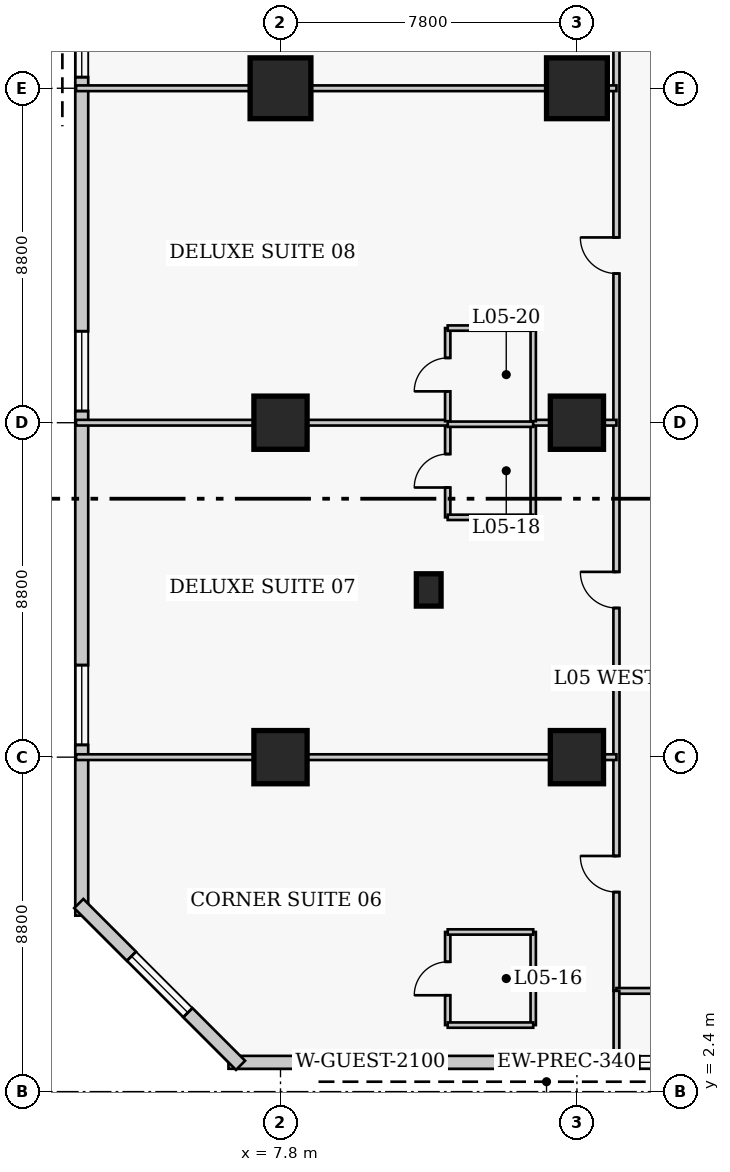
"""IFC4 building model, lengths in metres.
Left out: names, types, materials, properties, quantities, classifications, styles, units other than length and angle.
Written with IfcOpenShell. Run it as: python <this file> out.ifc"""

import sys

from ifc_helpers import new_model, si_unit, direction, frame, frame_2d, origin, origin_2d, place, context, subcontext, project, spatial, rectangle, extrude, element, fill, save


model = new_model("IFC4")
c1 = context("Model", 3, precision=1e-05, world=origin(), true_north=direction((0.0, 1.0)))
c2 = subcontext(c1, "Body", "Model", "MODEL_VIEW")
j1 = project(units=[si_unit("LENGTHUNIT", "METRE"), si_unit("PLANEANGLEUNIT", "RADIAN")], contexts=[c1])
p1 = place(None, origin())
s1 = spatial("IfcSite", under=j1, at=p1, CompositionType="ELEMENT")
p2 = place(p1, origin())
s2 = spatial("IfcBuilding", under=s1, at=p2, CompositionType="ELEMENT")
p3 = place(p2, frame((0.0, 0.0, 26.0)))
s3 = spatial("IfcBuildingStorey", under=s2, at=p3, CompositionType="ELEMENT", Elevation=26.0)
for number, where, z_axis, x_axis in (
    (1, (7.8, 11.2, 0.0), (0.0, 0.0, 1.0), (1.0, 0.0, 0.0)),
    (2, (7.8, 20.0, 0.0), (0.0, 0.0, 1.0), (1.0, 0.0, 0.0)),
):
    element("IfcColumn", number, at=place(p3, frame(where, z_axis=z_axis, x_axis=x_axis)), inside=s3, PredefinedType="COLUMN", context=c2, shape_type="SweptSolid", body=[
        extrude(rectangle(XDim=1.4, YDim=1.4, at=origin_2d()), origin(), (0.0, 0.0, 1.0), 3.8),
    ])
p4 = place(p3, frame((7.8, 28.8, 0.0), z_axis=(0.0, 0.0, 1.0), x_axis=(1.0, 0.0, 0.0)))
e3 = element("IfcColumn", 3, at=p4, inside=s3, PredefinedType="COLUMN", context=c2, shape_type="SweptSolid", body=[
    extrude(rectangle(XDim=1.6, YDim=1.6, at=origin_2d()), origin(), (0.0, 0.0, 1.0), 3.8),
])
p5 = place(p3, frame((15.6, 11.2, 0.0), z_axis=(0.0, 0.0, 1.0), x_axis=(1.0, 0.0, 0.0)))
e4 = element("IfcColumn", 4, at=p5, inside=s3, PredefinedType="COLUMN", context=c2, shape_type="SweptSolid", body=[
    extrude(rectangle(XDim=1.4, YDim=1.4, at=origin_2d()), origin(), (0.0, 0.0, 1.0), 3.8),
])
p6 = place(p3, frame((15.6, 20.0, -0.26), z_axis=(0.0, 0.0, 1.0), x_axis=(1.0, 0.0, 0.0)))
e5 = element("IfcColumn", 5, at=p6, inside=s3, PredefinedType="COLUMN", context=c2, shape_type="SweptSolid", body=[
    extrude(rectangle(XDim=1.4, YDim=1.4, at=origin_2d()), origin(), (0.0, 0.0, 1.0), 4.06),
])
p7 = place(p3, frame((15.6, 28.8, 0.0), z_axis=(0.0, 0.0, 1.0), x_axis=(1.0, 0.0, 0.0)))
e6 = element("IfcColumn", 6, at=p7, inside=s3, PredefinedType="COLUMN", context=c2, shape_type="SweptSolid", body=[
    extrude(rectangle(XDim=1.6, YDim=1.6, at=origin_2d()), origin(), (0.0, 0.0, 1.0), 3.8),
])
p8 = place(p3, frame((11.7, 15.6, 0.0), z_axis=(0.0, 0.0, 1.0), x_axis=(1.0, 0.0, 0.0)))
e7 = element("IfcColumn", 7, at=p8, inside=s3, PredefinedType="PILASTER", context=c2, shape_type="SweptSolid", body=[
    extrude(rectangle(XDim=0.65, YDim=0.85, at=origin_2d()), origin(), (0.0, 0.0, 1.0), 3.8),
])
p9 = place(p3, frame((6.43, 3.17, 0.0), z_axis=(0.0, 0.0, 1.0), x_axis=(1.0, 0.0, 0.0)))
e8 = element("IfcWall", 8, at=p9, inside=s3, PredefinedType="SOLIDWALL", context=c2, shape_type="SweptSolid", body=[
    extrude(rectangle(XDim=29.89, YDim=0.34, at=frame_2d((14.945, 0.0))), origin(), (0.0, 0.0, 1.0), 3.54),
])
p10 = place(p9, frame((2.686, 0.0, 0.85)))
e9 = element("IfcOpeningElement", 9, at=p10, cuts=e8, PredefinedType="OPENING", context=c2, shape_type="SweptSolid", body=[
    extrude(rectangle(XDim=2.1, YDim=1.85, at=frame_2d((1.05, 0.925))), frame((0.0, 0.18, 0.0), z_axis=(0.0, -1.0, 0.0), x_axis=(1.0, 0.0, 0.0)), (0.0, 0.0, 1.0), 0.36),
])
p11 = place(p9, frame((10.809, 0.0, 0.85)))
e10 = element("IfcOpeningElement", 10, at=p11, cuts=e8, PredefinedType="OPENING", context=c2, shape_type="SweptSolid", body=[
    extrude(rectangle(XDim=2.1, YDim=1.85, at=frame_2d((1.05, 0.925))), frame((0.0, 0.18, 0.0), z_axis=(0.0, -1.0, 0.0), x_axis=(1.0, 0.0, 0.0)), (0.0, 0.0, 1.0), 0.36),
])
p12 = place(p9, frame((18.281, 0.0, 0.85)))
e11 = element("IfcOpeningElement", 11, at=p12, cuts=e8, PredefinedType="OPENING", context=c2, shape_type="SweptSolid", body=[
    extrude(rectangle(XDim=2.1, YDim=1.85, at=frame_2d((1.05, 0.925))), frame((0.0, 0.18, 0.0), z_axis=(0.0, -1.0, 0.0), x_axis=(1.0, 0.0, 0.0)), (0.0, 0.0, 1.0), 0.36),
])
p13 = place(p9, frame((25.104, 0.0, 0.85)))
e12 = element("IfcOpeningElement", 12, at=p13, cuts=e8, PredefinedType="OPENING", context=c2, shape_type="SweptSolid", body=[
    extrude(rectangle(XDim=2.1, YDim=1.85, at=frame_2d((1.05, 0.925))), frame((0.0, 0.18, 0.0), z_axis=(0.0, -1.0, 0.0), x_axis=(1.0, 0.0, 0.0)), (0.0, 0.0, 1.0), 0.36),
])
p14 = place(p3, frame((2.57, 42.17, 0.0), z_axis=(0.0, 0.0, 1.0), x_axis=(0.0, -1.0, 0.0)))
e13 = element("IfcWall", 13, at=p14, inside=s3, PredefinedType="SOLIDWALL", context=c2, shape_type="SweptSolid", body=[
    extrude(rectangle(XDim=35.14, YDim=0.34, at=frame_2d((17.57, 0.0))), origin(), (0.0, 0.0, 1.0), 3.54),
])
p15 = place(p14, frame((3.343, 0.0, 0.85)))
e14 = element("IfcOpeningElement", 14, at=p15, cuts=e13, PredefinedType="OPENING", context=c2, shape_type="SweptSolid", body=[
    extrude(rectangle(XDim=2.1, YDim=1.85, at=frame_2d((1.05, 0.925))), frame((0.0, 0.18, 0.0), z_axis=(0.0, -1.0, 0.0), x_axis=(1.0, 0.0, 0.0)), (0.0, 0.0, 1.0), 0.36),
])
p16 = place(p14, frame((10.978, 0.0, 0.85)))
e15 = element("IfcOpeningElement", 15, at=p16, cuts=e13, PredefinedType="OPENING", context=c2, shape_type="SweptSolid", body=[
    extrude(rectangle(XDim=2.1, YDim=1.85, at=frame_2d((1.05, 0.925))), frame((0.0, 0.18, 0.0), z_axis=(0.0, -1.0, 0.0), x_axis=(1.0, 0.0, 0.0)), (0.0, 0.0, 1.0), 0.36),
])
p17 = place(p14, frame((19.762, 0.0, 0.85)))
e16 = element("IfcOpeningElement", 16, at=p17, cuts=e13, PredefinedType="OPENING", context=c2, shape_type="SweptSolid", body=[
    extrude(rectangle(XDim=2.1, YDim=1.85, at=frame_2d((1.05, 0.925))), frame((0.0, 0.18, 0.0), z_axis=(0.0, -1.0, 0.0), x_axis=(1.0, 0.0, 0.0)), (0.0, 0.0, 1.0), 0.36),
])
p18 = place(p14, frame((28.548, 0.0, 0.85)))
e17 = element("IfcOpeningElement", 17, at=p18, cuts=e13, PredefinedType="OPENING", context=c2, shape_type="SweptSolid", body=[
    extrude(rectangle(XDim=2.1, YDim=1.85, at=frame_2d((1.05, 0.925))), frame((0.0, 0.18, 0.0), z_axis=(0.0, -1.0, 0.0), x_axis=(1.0, 0.0, 0.0)), (0.0, 0.0, 1.0), 0.36),
])
p19 = place(p3, frame((2.492, 7.348, 0.0), z_axis=(0.0, 0.0, 1.0), x_axis=(0.707106781187, -0.707106781187, 0.0)))
e18 = element("IfcWall", 18, at=p19, inside=s3, PredefinedType="SOLIDWALL", context=c2, shape_type="SweptSolid", body=[
    extrude(rectangle(XDim=6.02, YDim=0.34, at=frame_2d((3.01, 0.0))), origin(), (0.0, 0.0, 1.0), 3.54),
])
p20 = place(p19, frame((1.96, 0.0, 0.85)))
e19 = element("IfcOpeningElement", 19, at=p20, cuts=e18, PredefinedType="OPENING", context=c2, shape_type="SweptSolid", body=[
    extrude(rectangle(XDim=2.1, YDim=1.85, at=frame_2d((1.05, 0.925))), frame((0.0, 0.18, 0.0), z_axis=(0.0, -1.0, 0.0), x_axis=(1.0, 0.0, 0.0)), (0.0, 0.0, 1.0), 0.36),
])
p21 = place(p3, frame((16.64, 5.05, 0.0), z_axis=(0.0, 0.0, 1.0), x_axis=(0.0, 1.0, 0.0)))
e20 = element("IfcWall", 20, at=p21, inside=s3, PredefinedType="PARTITIONING", context=c2, shape_type="SweptSolid", body=[
    extrude(rectangle(XDim=35.6, YDim=0.16, at=frame_2d((17.8, 0.0))), origin(), (0.0, 0.0, 1.0), 3.54),
])
p22 = place(p21, frame((2.6, 0.0, 0.0)))
e21 = element("IfcOpeningElement", 21, at=p22, cuts=e20, PredefinedType="OPENING", context=c2, shape_type="SweptSolid", body=[
    extrude(rectangle(XDim=0.95, YDim=2.1, at=frame_2d((0.475, 1.05))), frame((0.0, 0.09, 0.0), z_axis=(0.0, -1.0, 0.0), x_axis=(1.0, 0.0, 0.0)), (0.0, 0.0, 1.0), 0.18),
])
p23 = place(p21, frame((10.075, 0.0, 0.0)))
e22 = element("IfcOpeningElement", 22, at=p23, cuts=e20, PredefinedType="OPENING", context=c2, shape_type="SweptSolid", body=[
    extrude(rectangle(XDim=0.95, YDim=2.1, at=frame_2d((0.475, 1.05))), frame((0.0, 0.09, 0.0), z_axis=(0.0, -1.0, 0.0), x_axis=(1.0, 0.0, 0.0)), (0.0, 0.0, 1.0), 0.18),
])
p24 = place(p21, frame((18.875, 0.0, 0.0)))
e23 = element("IfcOpeningElement", 23, at=p24, cuts=e20, PredefinedType="OPENING", context=c2, shape_type="SweptSolid", body=[
    extrude(rectangle(XDim=0.95, YDim=2.1, at=frame_2d((0.475, 1.05))), frame((0.0, 0.09, 0.0), z_axis=(0.0, -1.0, 0.0), x_axis=(1.0, 0.0, 0.0)), (0.0, 0.0, 1.0), 0.18),
])
p25 = place(p21, frame((26.575, 0.0, 0.0)))
e24 = element("IfcOpeningElement", 24, at=p25, cuts=e20, PredefinedType="OPENING", context=c2, shape_type="SweptSolid", body=[
    extrude(rectangle(XDim=0.95, YDim=2.1, at=frame_2d((0.475, 1.05))), frame((0.0, 0.09, 0.0), z_axis=(0.0, -1.0, 0.0), x_axis=(1.0, 0.0, 0.0)), (0.0, 0.0, 1.0), 0.18),
])
p26 = place(p21, frame((30.9, 0.0, 0.0)))
e25 = element("IfcOpeningElement", 25, at=p26, cuts=e20, PredefinedType="OPENING", context=c2, shape_type="SweptSolid", body=[
    extrude(rectangle(XDim=1.0, YDim=2.15, at=frame_2d((0.5, 1.075))), frame((0.0, 0.09, 0.0), z_axis=(0.0, -1.0, 0.0), x_axis=(1.0, 0.0, 0.0)), (0.0, 0.0, 1.0), 0.18),
])
p27 = place(p3, frame((16.64, 5.05, 0.0), z_axis=(0.0, 0.0, 1.0), x_axis=(1.0, 0.0, 0.0)))
e26 = element("IfcWall", 26, at=p27, inside=s3, PredefinedType="PARTITIONING", context=c2, shape_type="SweptSolid", body=[
    extrude(rectangle(XDim=2.22, YDim=0.15, at=frame_2d((1.11, 0.0))), origin(), (0.0, 0.0, 1.0), 3.54),
])
p28 = place(p3, frame((16.64, 3.02, 0.0), z_axis=(0.0, 0.0, 1.0), x_axis=(0.0, 1.0, 0.0)))
e27 = element("IfcWall", 27, at=p28, inside=s3, PredefinedType="PARTITIONING", context=c2, shape_type="SweptSolid", body=[
    extrude(rectangle(XDim=2.03, YDim=0.15, at=frame_2d((1.015, 0.0))), origin(), (0.0, 0.0, 1.0), 3.54),
])
p29 = place(p3, frame((12.2, 4.15, 0.0), z_axis=(0.0, 0.0, 1.0), x_axis=(0.0, 1.0, 0.0)))
e28 = element("IfcWall", 28, at=p29, inside=s3, PredefinedType="PLUMBINGWALL", context=c2, shape_type="SweptSolid", body=[
    extrude(rectangle(XDim=2.45, YDim=0.14, at=frame_2d((1.225, 0.0))), origin(), (0.0, 0.0, 1.0), 3.54),
])
p30 = place(p29, frame((0.785, 0.0, 0.0)))
e29 = element("IfcOpeningElement", 29, at=p30, cuts=e28, PredefinedType="OPENING", context=c2, shape_type="SweptSolid", body=[
    extrude(rectangle(XDim=0.88, YDim=2.05, at=frame_2d((0.44, 1.025))), frame((0.0, 0.08, 0.0), z_axis=(0.0, -1.0, 0.0), x_axis=(1.0, 0.0, 0.0)), (0.0, 0.0, 1.0), 0.16),
])
p31 = place(p3, frame((14.45, 4.15, 0.0), z_axis=(0.0, 0.0, 1.0), x_axis=(0.0, 1.0, 0.0)))
e30 = element("IfcWall", 30, at=p31, inside=s3, PredefinedType="PLUMBINGWALL", context=c2, shape_type="SweptSolid", body=[
    extrude(rectangle(XDim=2.45, YDim=0.14, at=frame_2d((1.225, 0.0))), origin(), (0.0, 0.0, 1.0), 3.54),
])
for number, where, z_axis, x_axis in (
    (31, (12.2, 4.15, 0.0), (0.0, 0.0, 1.0), (1.0, 0.0, 0.0)),
    (32, (12.2, 6.6, 0.0), (0.0, 0.0, 1.0), (1.0, 0.0, 0.0)),
):
    element("IfcWall", number, at=place(p3, frame(where, z_axis=z_axis, x_axis=x_axis)), inside=s3, PredefinedType="PLUMBINGWALL", context=c2, shape_type="SweptSolid", body=[
        extrude(rectangle(XDim=2.25, YDim=0.14, at=frame_2d((1.125, 0.0))), origin(), (0.0, 0.0, 1.0), 3.54),
    ])
p32 = place(p3, frame((2.42, 11.2, 0.0), z_axis=(0.0, 0.0, 1.0), x_axis=(1.0, 0.0, 0.0)))
e33 = element("IfcWall", 33, at=p32, inside=s3, PredefinedType="PARTITIONING", context=c2, shape_type="SweptSolid", body=[
    extrude(rectangle(XDim=14.22, YDim=0.15, at=frame_2d((7.11, 0.0))), origin(), (0.0, 0.0, 1.0), 2.593),
])
p33 = place(p3, frame((12.2, 17.51, 0.0), z_axis=(0.0, 0.0, 1.0), x_axis=(0.0, 1.0, 0.0)))
e34 = element("IfcWall", 34, at=p33, inside=s3, PredefinedType="PLUMBINGWALL", context=c2, shape_type="SweptSolid", body=[
    extrude(rectangle(XDim=2.45, YDim=0.14, at=frame_2d((1.225, 0.0))), origin(), (0.0, 0.0, 1.0), 3.54),
])
p34 = place(p33, frame((0.785, 0.0, 0.0)))
e35 = element("IfcOpeningElement", 35, at=p34, cuts=e34, PredefinedType="OPENING", context=c2, shape_type="SweptSolid", body=[
    extrude(rectangle(XDim=0.88, YDim=2.05, at=frame_2d((0.44, 1.025))), frame((0.0, 0.08, 0.0), z_axis=(0.0, -1.0, 0.0), x_axis=(1.0, 0.0, 0.0)), (0.0, 0.0, 1.0), 0.16),
])
p35 = place(p3, frame((14.45, 17.51, 0.0), z_axis=(0.0, 0.0, 1.0), x_axis=(0.0, 1.0, 0.0)))
e36 = element("IfcWall", 36, at=p35, inside=s3, PredefinedType="PLUMBINGWALL", context=c2, shape_type="SweptSolid", body=[
    extrude(rectangle(XDim=2.45, YDim=0.14, at=frame_2d((1.225, 0.0))), origin(), (0.0, 0.0, 1.0), 3.54),
])
p36 = place(p3, frame((12.2, 17.51, 0.0), z_axis=(0.0, 0.0, 1.0), x_axis=(1.0, 0.0, 0.0)))
e37 = element("IfcWall", 37, at=p36, inside=s3, PredefinedType="PLUMBINGWALL", context=c2, shape_type="SweptSolid", body=[
    extrude(rectangle(XDim=2.25, YDim=0.14, at=frame_2d((1.125, 0.0))), origin(), (0.0, 0.0, 1.0), 3.54),
])
p37 = place(p3, frame((12.2, 19.96, 0.0), z_axis=(0.0, 0.0, 1.0), x_axis=(1.0, 0.0, 0.0)))
e38 = element("IfcWall", 38, at=p37, inside=s3, PredefinedType="PLUMBINGWALL", context=c2, shape_type="SweptSolid", body=[
    extrude(rectangle(XDim=2.25, YDim=0.14, at=frame_2d((1.125, 0.0))), origin(), (0.0, 0.0, 1.0), 2.593),
])
p38 = place(p3, frame((2.42, 20.0, 0.0), z_axis=(0.0, 0.0, 1.0), x_axis=(1.0, 0.0, 0.0)))
e39 = element("IfcWall", 39, at=p38, inside=s3, PredefinedType="PARTITIONING", context=c2, shape_type="SweptSolid", body=[
    extrude(rectangle(XDim=9.78, YDim=0.15, at=frame_2d((4.89, 0.0))), origin(), (0.0, 0.0, 1.0), 2.593),
])
p39 = place(p3, frame((14.45, 20.0, 0.0), z_axis=(0.0, 0.0, 1.0), x_axis=(1.0, 0.0, 0.0)))
e40 = element("IfcWall", 40, at=p39, inside=s3, PredefinedType="PARTITIONING", context=c2, shape_type="SweptSolid", body=[
    extrude(rectangle(XDim=2.19, YDim=0.15, at=frame_2d((1.095, 0.0))), origin(), (0.0, 0.0, 1.0), 2.593),
])
p40 = place(p3, frame((12.2, 20.04, 0.0), z_axis=(0.0, 0.0, 1.0), x_axis=(0.0, 1.0, 0.0)))
e41 = element("IfcWall", 41, at=p40, inside=s3, PredefinedType="PLUMBINGWALL", context=c2, shape_type="SweptSolid", body=[
    extrude(rectangle(XDim=2.45, YDim=0.14, at=frame_2d((1.225, 0.0))), origin(), (0.0, 0.0, 1.0), 3.54),
])
p41 = place(p40, frame((0.785, 0.0, 0.0)))
e42 = element("IfcOpeningElement", 42, at=p41, cuts=e41, PredefinedType="OPENING", context=c2, shape_type="SweptSolid", body=[
    extrude(rectangle(XDim=0.88, YDim=2.05, at=frame_2d((0.44, 1.025))), frame((0.0, 0.08, 0.0), z_axis=(0.0, -1.0, 0.0), x_axis=(1.0, 0.0, 0.0)), (0.0, 0.0, 1.0), 0.16),
])
p42 = place(p3, frame((14.45, 20.04, 0.0), z_axis=(0.0, 0.0, 1.0), x_axis=(0.0, 1.0, 0.0)))
e43 = element("IfcWall", 43, at=p42, inside=s3, PredefinedType="PLUMBINGWALL", context=c2, shape_type="SweptSolid", body=[
    extrude(rectangle(XDim=2.45, YDim=0.14, at=frame_2d((1.225, 0.0))), origin(), (0.0, 0.0, 1.0), 3.54),
])
p43 = place(p3, frame((12.2, 22.49, 0.0), z_axis=(0.0, 0.0, 1.0), x_axis=(1.0, 0.0, 0.0)))
e44 = element("IfcWall", 44, at=p43, inside=s3, PredefinedType="PLUMBINGWALL", context=c2, shape_type="SweptSolid", body=[
    extrude(rectangle(XDim=2.25, YDim=0.14, at=frame_2d((1.125, 0.0))), origin(), (0.0, 0.0, 1.0), 3.54),
])
p44 = place(p3, frame((2.42, 28.8, 0.0), z_axis=(0.0, 0.0, 1.0), x_axis=(1.0, 0.0, 0.0)))
e45 = element("IfcWall", 45, at=p44, inside=s3, PredefinedType="PARTITIONING", context=c2, shape_type="SweptSolid", body=[
    extrude(rectangle(XDim=14.22, YDim=0.15, at=frame_2d((7.11, 0.0))), origin(), (0.0, 0.0, 1.0), 2.593),
])
p45 = place(p10, origin())
e46 = element("IfcWindow", 46, at=p45, inside=s3, PartitioningType="SINGLE_PANEL", PredefinedType="WINDOW", context=c2, shape_type="SweptSolid", body=[
    extrude(rectangle(XDim=2.1, YDim=1.85, at=frame_2d((1.05, 0.925))), frame((0.0, 0.03, 0.0), z_axis=(0.0, -1.0, 0.0), x_axis=(1.0, 0.0, 0.0)), (0.0, 0.0, 1.0), 0.06),
])
fill(e9, e46)
p46 = place(p11, origin())
e47 = element("IfcWindow", 47, at=p46, inside=s3, PartitioningType="SINGLE_PANEL", PredefinedType="WINDOW", context=c2, shape_type="SweptSolid", body=[
    extrude(rectangle(XDim=2.1, YDim=1.85, at=frame_2d((1.05, 0.925))), frame((0.0, 0.03, 0.0), z_axis=(0.0, -1.0, 0.0), x_axis=(1.0, 0.0, 0.0)), (0.0, 0.0, 1.0), 0.06),
])
fill(e10, e47)
p47 = place(p16, origin())
e48 = element("IfcWindow", 48, at=p47, inside=s3, PartitioningType="SINGLE_PANEL", PredefinedType="WINDOW", context=c2, shape_type="SweptSolid", body=[
    extrude(rectangle(XDim=2.1, YDim=1.85, at=frame_2d((1.05, 0.925))), frame((0.0, 0.03, 0.0), z_axis=(0.0, -1.0, 0.0), x_axis=(1.0, 0.0, 0.0)), (0.0, 0.0, 1.0), 0.06),
])
fill(e15, e48)
p48 = place(p17, origin())
e49 = element("IfcWindow", 49, at=p48, inside=s3, PartitioningType="SINGLE_PANEL", PredefinedType="WINDOW", context=c2, shape_type="SweptSolid", body=[
    extrude(rectangle(XDim=2.1, YDim=1.85, at=frame_2d((1.05, 0.925))), frame((0.0, 0.03, 0.0), z_axis=(0.0, -1.0, 0.0), x_axis=(1.0, 0.0, 0.0)), (0.0, 0.0, 1.0), 0.06),
])
fill(e16, e49)
p49 = place(p18, origin())
e50 = element("IfcWindow", 50, at=p49, inside=s3, PartitioningType="SINGLE_PANEL", PredefinedType="WINDOW", context=c2, shape_type="SweptSolid", body=[
    extrude(rectangle(XDim=2.1, YDim=1.85, at=frame_2d((1.05, 0.925))), frame((0.0, 0.03, 0.0), z_axis=(0.0, -1.0, 0.0), x_axis=(1.0, 0.0, 0.0)), (0.0, 0.0, 1.0), 0.06),
])
fill(e17, e50)
p50 = place(p20, origin())
e51 = element("IfcWindow", 51, at=p50, inside=s3, PartitioningType="SINGLE_PANEL", PredefinedType="WINDOW", context=c2, shape_type="SweptSolid", body=[
    extrude(rectangle(XDim=2.1, YDim=1.85, at=frame_2d((1.05, 0.925))), frame((0.0, 0.03, 0.0), z_axis=(0.0, -1.0, 0.0), x_axis=(1.0, 0.0, 0.0)), (0.0, 0.0, 1.0), 0.06),
])
fill(e19, e51)
p51 = place(p30, origin())
e52 = element("IfcDoor", 52, at=p51, inside=s3, OperationType="SINGLE_SWING_LEFT", PredefinedType="DOOR", context=c2, shape_type="SweptSolid", body=[
    extrude(rectangle(XDim=0.88, YDim=2.05, at=frame_2d((0.44, 1.025))), frame((0.0, 0.025, 0.0), z_axis=(0.0, -1.0, 0.0), x_axis=(1.0, 0.0, 0.0)), (0.0, 0.0, 1.0), 0.05),
])
fill(e29, e52)
p52 = place(p22, origin())
e53 = element("IfcDoor", 53, at=p52, inside=s3, OperationType="SINGLE_SWING_RIGHT", PredefinedType="DOOR", context=c2, shape_type="SweptSolid", body=[
    extrude(rectangle(XDim=0.95, YDim=2.1, at=frame_2d((0.475, 1.05))), frame((0.0, 0.025, 0.0), z_axis=(0.0, -1.0, 0.0), x_axis=(1.0, 0.0, 0.0)), (0.0, 0.0, 1.0), 0.05),
])
fill(e21, e53)
p53 = place(p34, origin())
e54 = element("IfcDoor", 54, at=p53, inside=s3, OperationType="SINGLE_SWING_LEFT", PredefinedType="DOOR", context=c2, shape_type="SweptSolid", body=[
    extrude(rectangle(XDim=0.88, YDim=2.05, at=frame_2d((0.44, 1.025))), frame((0.0, 0.025, 0.0), z_axis=(0.0, -1.0, 0.0), x_axis=(1.0, 0.0, 0.0)), (0.0, 0.0, 1.0), 0.05),
])
fill(e35, e54)
p54 = place(p23, origin())
e55 = element("IfcDoor", 55, at=p54, inside=s3, OperationType="SINGLE_SWING_RIGHT", PredefinedType="DOOR", context=c2, shape_type="SweptSolid", body=[
    extrude(rectangle(XDim=0.95, YDim=2.1, at=frame_2d((0.475, 1.05))), frame((0.0, 0.025, 0.0), z_axis=(0.0, -1.0, 0.0), x_axis=(1.0, 0.0, 0.0)), (0.0, 0.0, 1.0), 0.05),
])
fill(e22, e55)
p55 = place(p41, origin())
e56 = element("IfcDoor", 56, at=p55, inside=s3, OperationType="SINGLE_SWING_LEFT", PredefinedType="DOOR", context=c2, shape_type="SweptSolid", body=[
    extrude(rectangle(XDim=0.88, YDim=2.05, at=frame_2d((0.44, 1.025))), frame((0.0, 0.025, 0.0), z_axis=(0.0, -1.0, 0.0), x_axis=(1.0, 0.0, 0.0)), (0.0, 0.0, 1.0), 0.05),
])
fill(e42, e56)
p56 = place(p24, origin())
e57 = element("IfcDoor", 57, at=p56, inside=s3, OperationType="SINGLE_SWING_RIGHT", PredefinedType="DOOR", context=c2, shape_type="SweptSolid", body=[
    extrude(rectangle(XDim=0.95, YDim=2.1, at=frame_2d((0.475, 1.05))), frame((0.0, 0.025, 0.0), z_axis=(0.0, -1.0, 0.0), x_axis=(1.0, 0.0, 0.0)), (0.0, 0.0, 1.0), 0.05),
])
fill(e23, e57)
save(model, sys.argv[1])
